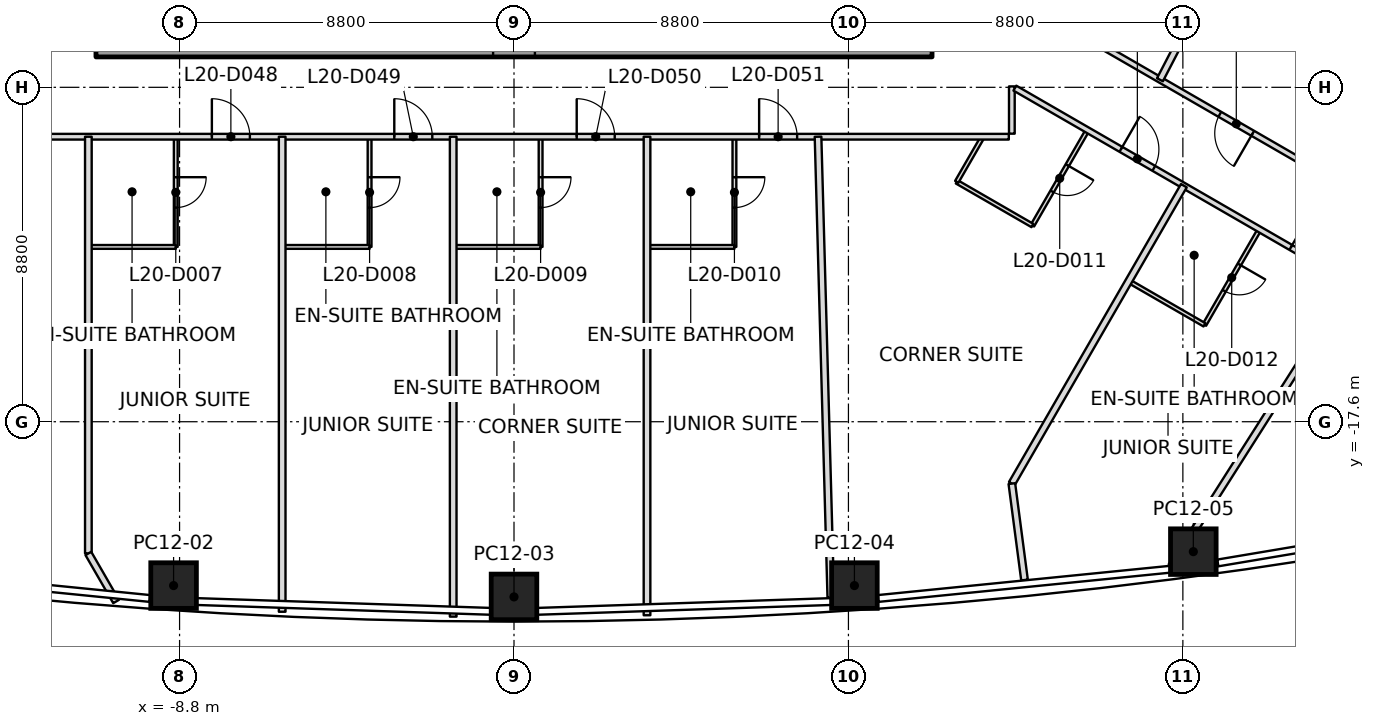
"""IFC4 building model, lengths in metres.
Left out: names, types, materials, properties, quantities, classifications, styles, units other than length and angle.
Written with IfcOpenShell. Run it as: python <this file> out.ifc"""

import sys

from ifc_helpers import new_model, si_unit, direction, frame, frame_2d, origin, origin_2d, place, context, subcontext, project, spatial, rectangle, extrude, element, fill, save


model = new_model("IFC4")
c1 = context("Model", 3, precision=1e-05, world=origin(), true_north=direction((0.0, 1.0)))
c2 = subcontext(c1, "Body", "Model", "MODEL_VIEW")
j1 = project(units=[si_unit("LENGTHUNIT", "METRE"), si_unit("PLANEANGLEUNIT", "RADIAN")], contexts=[c1])
p1 = place(None, origin())
s1 = spatial("IfcSite", under=j1, at=p1, CompositionType="ELEMENT")
p2 = place(p1, origin())
s2 = spatial("IfcBuilding", under=s1, at=p2, CompositionType="ELEMENT")
p3 = place(p2, frame((0.0, 0.0, 96.1)))
s3 = spatial("IfcBuildingStorey", under=s2, at=p3, CompositionType="ELEMENT", Elevation=96.1)
p4 = place(p3, frame((-8.958, -21.912, 0.0), z_axis=(0.009632635025, 0.012073782257, 0.999880710947), x_axis=(-0.997741389803, 0.066592340641, 0.008807907923)))
e1 = element("IfcColumn", 1, at=p4, inside=s3, PredefinedType="COLUMN", context=c2, shape_type="SweptSolid", body=[
    extrude(rectangle(XDim=1.2, YDim=1.2, at=origin_2d()), origin(), (0.0, 0.0, 1.0), 3.7),
])
p5 = place(p3, frame((0.0, -22.21, 0.0), z_axis=(0.0, 0.012338222751, 0.999923881233), x_axis=(1.0, 0.0, 0.0)))
e2 = element("IfcColumn", 2, at=p5, inside=s3, PredefinedType="COLUMN", context=c2, shape_type="SweptSolid", body=[
    extrude(rectangle(XDim=1.2, YDim=1.2, at=origin_2d()), origin(), (0.0, 0.0, 1.0), 3.7),
])
p6 = place(p3, frame((8.958, -21.912, 0.0), z_axis=(-0.009632635025, 0.012073782257, 0.999880710947), x_axis=(0.997741389803, 0.066592340641, 0.008807907923)))
e3 = element("IfcColumn", 3, at=p6, inside=s3, PredefinedType="COLUMN", context=c2, shape_type="SweptSolid", body=[
    extrude(rectangle(XDim=1.2, YDim=1.2, at=origin_2d()), origin(), (0.0, 0.0, 1.0), 3.7),
])
p7 = place(p3, frame((17.875, -21.019, 0.0), z_axis=(-0.019196808933, 0.011346567479, 0.99975133805), x_axis=(0.990978101664, 0.132873777201, 0.01752031263)))
e4 = element("IfcColumn", 4, at=p7, inside=s3, PredefinedType="COLUMN", context=c2, shape_type="SweptSolid", body=[
    extrude(rectangle(XDim=1.2, YDim=1.2, at=origin_2d()), origin(), (0.0, 0.0, 1.0), 3.701),
])
p8 = place(p3, frame((-11.0, -7.75, 0.0), z_axis=(0.0, 0.0, 1.0), x_axis=(1.0, 0.0, 0.0)))
e5 = element("IfcWall", 5, at=p8, inside=s3, PredefinedType="SHEAR", context=c2, shape_type="SweptSolid", body=[
    extrude(rectangle(XDim=22.0, YDim=0.5, at=frame_2d((11.0, 0.0))), origin(), (0.0, 0.0, 1.0), 3.7),
])
p9 = place(p8, frame((10.45, 0.0, 0.0)))
e6 = element("IfcOpeningElement", 6, at=p9, cuts=e5, PredefinedType="OPENING", context=c2, shape_type="SweptSolid", body=[
    extrude(rectangle(XDim=1.1, YDim=2.1, at=frame_2d((0.55, 1.05))), frame((0.0, 0.25, 0.0), z_axis=(0.0, -1.0, 0.0), x_axis=(1.0, 0.0, 0.0)), (0.0, 0.0, 1.0), 0.5),
])
p10 = place(p3, frame((-11.2, -10.1, 0.0), z_axis=(0.0, 0.0, 1.0), x_axis=(0.0, -1.0, 0.0)))
e7 = element("IfcWall", 7, at=p10, inside=s3, PredefinedType="PARTITIONING", context=c2, shape_type="SweptSolid", body=[
    extrude(rectangle(XDim=10.967, YDim=0.175, at=frame_2d((5.483, 0.0))), origin(), (0.0, 0.0, 1.0), 3.017),
])
p11 = place(p3, frame((-11.2, -21.067, 0.0), z_axis=(0.0, 0.0, 1.0), x_axis=(0.499934806282, -0.866063040123, 0.0)))
e8 = element("IfcWall", 8, at=p11, inside=s3, PredefinedType="PARTITIONING", context=c2, shape_type="SweptSolid", body=[
    extrude(rectangle(XDim=1.46, YDim=0.175, at=frame_2d((0.73, 0.0))), origin(), (0.0, 0.0, 1.0), 2.934),
])
p12 = place(p3, frame((-6.1, -10.1, 0.0), z_axis=(0.0, 0.0, 1.0), x_axis=(0.0, -1.0, 0.0)))
e9 = element("IfcWall", 9, at=p12, inside=s3, PredefinedType="PARTITIONING", context=c2, shape_type="SweptSolid", body=[
    extrude(rectangle(XDim=12.5, YDim=0.175, at=frame_2d((6.25, 0.0))), origin(), (0.0, 0.0, 1.0), 2.934),
])
p13 = place(p3, frame((-1.6, -10.1, 0.0), z_axis=(0.0, 0.0, 1.0), x_axis=(0.0, -1.0, 0.0)))
e10 = element("IfcWall", 10, at=p13, inside=s3, PredefinedType="PARTITIONING", context=c2, shape_type="SweptSolid", body=[
    extrude(rectangle(XDim=12.628, YDim=0.175, at=frame_2d((6.314, 0.0))), origin(), (0.0, 0.0, 1.0), 2.934),
])
p14 = place(p3, frame((3.5, -10.1, 0.0), z_axis=(0.0, 0.0, 1.0), x_axis=(0.0, -1.0, 0.0)))
e11 = element("IfcWall", 11, at=p14, inside=s3, PredefinedType="PARTITIONING", context=c2, shape_type="SweptSolid", body=[
    extrude(rectangle(XDim=12.593, YDim=0.175, at=frame_2d((6.296, 0.0))), origin(), (0.0, 0.0, 1.0), 2.934),
])
p15 = place(p3, frame((8.0, -10.1, 0.0), z_axis=(0.0, 0.0, 1.0), x_axis=(0.027718493396, -0.999615768745, 0.0)))
e12 = element("IfcWall", 12, at=p15, inside=s3, PredefinedType="PARTITIONING", context=c2, shape_type="SweptSolid", body=[
    extrude(rectangle(XDim=12.137, YDim=0.175, at=frame_2d((6.069, 0.0))), origin(), (0.0, 0.0, 1.0), 2.934),
])
p16 = place(p3, frame((17.626, -11.389, 0.0), z_axis=(0.0, 0.0, 1.0), x_axis=(-0.500005721567, -0.866022100411, 0.0)))
e13 = element("IfcWall", 13, at=p16, inside=s3, PredefinedType="PARTITIONING", context=c2, shape_type="SweptSolid", body=[
    extrude(rectangle(XDim=9.052, YDim=0.175, at=frame_2d((4.526, 0.0))), origin(), (0.0, 0.0, 1.0), 2.797),
])
p17 = place(p3, frame((13.1, -19.228, 0.0), z_axis=(0.0, 0.0, 1.0), x_axis=(0.130326176188, -0.991471173459, 0.0)))
e14 = element("IfcWall", 14, at=p17, inside=s3, PredefinedType="PARTITIONING", context=c2, shape_type="SweptSolid", body=[
    extrude(rectangle(XDim=2.559, YDim=0.175, at=frame_2d((1.279, 0.0))), origin(), (0.0, 0.0, 1.0), 2.934),
])
p18 = place(p3, frame((16.997, -8.601, 0.0), z_axis=(0.0, 0.0, 1.0), x_axis=(0.460362856216, 0.887730837933, 0.0)))
e15 = element("IfcWall", 15, at=p18, inside=s3, PredefinedType="PARTITIONING", context=c2, shape_type="SweptSolid", body=[
    extrude(rectangle(XDim=14.037, YDim=0.175, at=frame_2d((7.018, 0.0))), origin(), (0.0, 0.0, 1.0), 2.947),
])
p19 = place(p3, frame((22.043, -13.939, 0.0), z_axis=(0.0, 0.0, 1.0), x_axis=(-0.536501835105, -0.843899153293, 0.0)))
e16 = element("IfcWall", 16, at=p19, inside=s3, PredefinedType="PARTITIONING", context=c2, shape_type="SweptSolid", body=[
    extrude(rectangle(XDim=8.837, YDim=0.175, at=frame_2d((4.418, 0.0))), origin(), (0.0, 0.0, 1.0), 3.15),
])
p20 = place(p3, frame((-13.02, -10.1, 0.0), z_axis=(0.0, 0.0, 1.0), x_axis=(1.0, 0.0, 0.0)))
e17 = element("IfcWall", 17, at=p20, inside=s3, PredefinedType="PARTITIONING", context=c2, shape_type="SweptSolid", body=[
    extrude(rectangle(XDim=26.04, YDim=0.15, at=frame_2d((13.02, 0.0))), origin(), (0.0, 0.0, 1.0), 3.017),
])
p21 = place(p20, frame((5.07, 0.0, 0.0)))
e18 = element("IfcOpeningElement", 18, at=p21, cuts=e17, PredefinedType="OPENING", context=c2, shape_type="SweptSolid", body=[
    extrude(rectangle(XDim=1.0, YDim=2.1, at=frame_2d((0.5, 1.05))), frame((0.0, 0.075, 0.0), z_axis=(0.0, -1.0, 0.0), x_axis=(1.0, 0.0, 0.0)), (0.0, 0.0, 1.0), 0.15),
])
p22 = place(p20, frame((9.87, 0.0, 0.0)))
e19 = element("IfcOpeningElement", 19, at=p22, cuts=e17, PredefinedType="OPENING", context=c2, shape_type="SweptSolid", body=[
    extrude(rectangle(XDim=1.0, YDim=2.1, at=frame_2d((0.5, 1.05))), frame((0.0, 0.075, 0.0), z_axis=(0.0, -1.0, 0.0), x_axis=(1.0, 0.0, 0.0)), (0.0, 0.0, 1.0), 0.15),
])
p23 = place(p20, frame((14.67, 0.0, 0.0)))
e20 = element("IfcOpeningElement", 20, at=p23, cuts=e17, PredefinedType="OPENING", context=c2, shape_type="SweptSolid", body=[
    extrude(rectangle(XDim=1.0, YDim=2.1, at=frame_2d((0.5, 1.05))), frame((0.0, 0.075, 0.0), z_axis=(0.0, -1.0, 0.0), x_axis=(1.0, 0.0, 0.0)), (0.0, 0.0, 1.0), 0.15),
])
p24 = place(p20, frame((19.47, 0.0, 0.0)))
e21 = element("IfcOpeningElement", 21, at=p24, cuts=e17, PredefinedType="OPENING", context=c2, shape_type="SweptSolid", body=[
    extrude(rectangle(XDim=1.0, YDim=2.1, at=frame_2d((0.5, 1.05))), frame((0.0, 0.075, 0.0), z_axis=(0.0, -1.0, 0.0), x_axis=(1.0, 0.0, 0.0)), (0.0, 0.0, 1.0), 0.15),
])
p25 = place(p3, frame((13.1, -10.02, 0.0), z_axis=(0.0, 0.0, 1.0), x_axis=(0.0, 1.0, 0.0)))
e22 = element("IfcWall", 22, at=p25, inside=s3, PredefinedType="PARTITIONING", context=c2, shape_type="SweptSolid", body=[
    extrude(rectangle(XDim=1.244, YDim=0.15, at=frame_2d((0.622, 0.0))), origin(), (0.0, 0.0, 1.0), 2.797),
])
p26 = place(p3, frame((13.179, -8.822, 0.0), z_axis=(0.0, 0.0, 1.0), x_axis=(0.86603304561, -0.499986763735, 0.0)))
e23 = element("IfcWall", 23, at=p26, inside=s3, PredefinedType="PARTITIONING", context=c2, shape_type="SweptSolid", body=[
    extrude(rectangle(XDim=10.155, YDim=0.15, at=frame_2d((5.077, 0.0))), origin(), (0.0, 0.0, 1.0), 2.797),
])
p27 = place(p26, frame((3.222, 0.0, 0.0)))
e24 = element("IfcOpeningElement", 24, at=p27, cuts=e23, PredefinedType="OPENING", context=c2, shape_type="SweptSolid", body=[
    extrude(rectangle(XDim=1.0, YDim=2.1, at=frame_2d((0.5, 1.05))), frame((0.0, 0.075, 0.0), z_axis=(0.0, -1.0, 0.0), x_axis=(1.0, 0.0, 0.0)), (0.0, 0.0, 1.0), 0.15),
])
p28 = place(p26, frame((8.385, 0.0, 0.0)))
e25 = element("IfcOpeningElement", 25, at=p28, cuts=e23, PredefinedType="OPENING", context=c2, shape_type="SweptSolid", body=[
    extrude(rectangle(XDim=1.0, YDim=2.1, at=frame_2d((0.5, 1.05))), frame((0.0, 0.075, 0.0), z_axis=(0.0, -1.0, 0.0), x_axis=(1.0, 0.0, 0.0)), (0.0, 0.0, 1.0), 0.15),
])
p29 = place(p3, frame((23.023, -12.08, 0.0), z_axis=(0.0, 0.0, 1.0), x_axis=(-0.866025210421, 0.500000334915, 0.0)))
e26 = element("IfcWall", 26, at=p29, inside=s3, PredefinedType="PARTITIONING", context=c2, shape_type="SweptSolid", body=[
    extrude(rectangle(XDim=11.458, YDim=0.15, at=frame_2d((5.729, 0.0))), origin(), (0.0, 0.0, 1.0), 2.947),
])
p30 = place(p29, frame((4.139, 0.0, 0.0)))
e27 = element("IfcOpeningElement", 27, at=p30, cuts=e26, PredefinedType="OPENING", context=c2, shape_type="SweptSolid", body=[
    extrude(rectangle(XDim=1.0, YDim=2.1, at=frame_2d((0.5, 1.05))), frame((0.0, 0.075, 0.0), z_axis=(0.0, -1.0, 0.0), x_axis=(1.0, 0.0, 0.0)), (0.0, 0.0, 1.0), 0.15),
])
p31 = place(p3, frame((-8.9, -10.13, 0.0), z_axis=(0.0, 0.0, 1.0), x_axis=(0.0, -1.0, 0.0)))
e28 = element("IfcWall", 28, at=p31, inside=s3, PredefinedType="PARTITIONING", context=c2, shape_type="SweptSolid", body=[
    extrude(rectangle(XDim=2.87, YDim=0.1, at=frame_2d((1.435, 0.0))), origin(), (0.0, 0.0, 1.0), 3.15),
])
p32 = place(p31, frame((1.035, 0.0, 0.0)))
e29 = element("IfcOpeningElement", 29, at=p32, cuts=e28, PredefinedType="OPENING", context=c2, shape_type="SweptSolid", body=[
    extrude(rectangle(XDim=0.8, YDim=2.1, at=frame_2d((0.4, 1.05))), frame((0.0, 0.05, 0.0), z_axis=(0.0, -1.0, 0.0), x_axis=(1.0, 0.0, 0.0)), (0.0, 0.0, 1.0), 0.1),
])
p33 = place(p3, frame((-8.9, -13.0, 0.0), z_axis=(0.0, 0.0, 1.0), x_axis=(-1.0, 0.0, 0.0)))
e30 = element("IfcWall", 30, at=p33, inside=s3, PredefinedType="PARTITIONING", context=c2, shape_type="SweptSolid", body=[
    extrude(rectangle(XDim=2.27, YDim=0.1, at=frame_2d((1.135, 0.0))), origin(), (0.0, 0.0, 1.0), 3.15),
])
p34 = place(p3, frame((-3.8, -10.13, 0.0), z_axis=(0.0, 0.0, 1.0), x_axis=(0.0, -1.0, 0.0)))
e31 = element("IfcWall", 31, at=p34, inside=s3, PredefinedType="PARTITIONING", context=c2, shape_type="SweptSolid", body=[
    extrude(rectangle(XDim=2.87, YDim=0.1, at=frame_2d((1.435, 0.0))), origin(), (0.0, 0.0, 1.0), 3.15),
])
p35 = place(p34, frame((1.035, 0.0, 0.0)))
e32 = element("IfcOpeningElement", 32, at=p35, cuts=e31, PredefinedType="OPENING", context=c2, shape_type="SweptSolid", body=[
    extrude(rectangle(XDim=0.8, YDim=2.1, at=frame_2d((0.4, 1.05))), frame((0.0, 0.05, 0.0), z_axis=(0.0, -1.0, 0.0), x_axis=(1.0, 0.0, 0.0)), (0.0, 0.0, 1.0), 0.1),
])
p36 = place(p3, frame((-3.8, -13.0, 0.0), z_axis=(0.0, 0.0, 1.0), x_axis=(-1.0, 0.0, 0.0)))
e33 = element("IfcWall", 33, at=p36, inside=s3, PredefinedType="PARTITIONING", context=c2, shape_type="SweptSolid", body=[
    extrude(rectangle(XDim=2.27, YDim=0.1, at=frame_2d((1.135, 0.0))), origin(), (0.0, 0.0, 1.0), 3.017),
])
p37 = place(p3, frame((0.7, -10.13, 0.0), z_axis=(0.0, 0.0, 1.0), x_axis=(0.0, -1.0, 0.0)))
e34 = element("IfcWall", 34, at=p37, inside=s3, PredefinedType="PARTITIONING", context=c2, shape_type="SweptSolid", body=[
    extrude(rectangle(XDim=2.87, YDim=0.1, at=frame_2d((1.435, 0.0))), origin(), (0.0, 0.0, 1.0), 3.15),
])
p38 = place(p37, frame((1.035, 0.0, 0.0)))
e35 = element("IfcOpeningElement", 35, at=p38, cuts=e34, PredefinedType="OPENING", context=c2, shape_type="SweptSolid", body=[
    extrude(rectangle(XDim=0.8, YDim=2.1, at=frame_2d((0.4, 1.05))), frame((0.0, 0.05, 0.0), z_axis=(0.0, -1.0, 0.0), x_axis=(1.0, 0.0, 0.0)), (0.0, 0.0, 1.0), 0.1),
])
p39 = place(p3, frame((0.7, -13.0, 0.0), z_axis=(0.0, 0.0, 1.0), x_axis=(-1.0, 0.0, 0.0)))
e36 = element("IfcWall", 36, at=p39, inside=s3, PredefinedType="PARTITIONING", context=c2, shape_type="SweptSolid", body=[
    extrude(rectangle(XDim=2.27, YDim=0.1, at=frame_2d((1.135, 0.0))), origin(), (0.0, 0.0, 1.0), 3.017),
])
p40 = place(p3, frame((5.8, -10.13, 0.0), z_axis=(0.0, 0.0, 1.0), x_axis=(0.0, -1.0, 0.0)))
e37 = element("IfcWall", 37, at=p40, inside=s3, PredefinedType="PARTITIONING", context=c2, shape_type="SweptSolid", body=[
    extrude(rectangle(XDim=2.87, YDim=0.1, at=frame_2d((1.435, 0.0))), origin(), (0.0, 0.0, 1.0), 3.15),
])
p41 = place(p40, frame((1.035, 0.0, 0.0)))
e38 = element("IfcOpeningElement", 38, at=p41, cuts=e37, PredefinedType="OPENING", context=c2, shape_type="SweptSolid", body=[
    extrude(rectangle(XDim=0.8, YDim=2.1, at=frame_2d((0.4, 1.05))), frame((0.0, 0.05, 0.0), z_axis=(0.0, -1.0, 0.0), x_axis=(1.0, 0.0, 0.0)), (0.0, 0.0, 1.0), 0.1),
])
p42 = place(p3, frame((5.8, -13.0, 0.0), z_axis=(0.0, 0.0, 1.0), x_axis=(-1.0, 0.0, 0.0)))
e39 = element("IfcWall", 39, at=p42, inside=s3, PredefinedType="PARTITIONING", context=c2, shape_type="SweptSolid", body=[
    extrude(rectangle(XDim=2.27, YDim=0.1, at=frame_2d((1.135, 0.0))), origin(), (0.0, 0.0, 1.0), 3.017),
])
p43 = place(p3, frame((15.077, -9.952, 0.0), z_axis=(0.0, 0.0, 1.0), x_axis=(-0.499999802827, -0.866025517622, 0.0)))
e40 = element("IfcWall", 40, at=p43, inside=s3, PredefinedType="PARTITIONING", context=c2, shape_type="SweptSolid", body=[
    extrude(rectangle(XDim=2.87, YDim=0.1, at=frame_2d((1.435, 0.0))), origin(), (0.0, 0.0, 1.0), 2.797),
])
p44 = place(p43, frame((1.035, 0.0, 0.0)))
e41 = element("IfcOpeningElement", 41, at=p44, cuts=e40, PredefinedType="OPENING", context=c2, shape_type="SweptSolid", body=[
    extrude(rectangle(XDim=0.8, YDim=2.1, at=frame_2d((0.4, 1.05))), frame((0.0, 0.05, 0.0), z_axis=(0.0, -1.0, 0.0), x_axis=(1.0, 0.0, 0.0)), (0.0, 0.0, 1.0), 0.1),
])
p45 = place(p3, frame((13.642, -12.437, 0.0), z_axis=(0.0, 0.0, 1.0), x_axis=(-0.866007057882, 0.500031774688, 0.0)))
e42 = element("IfcWall", 42, at=p45, inside=s3, PredefinedType="PARTITIONING", context=c2, shape_type="SweptSolid", body=[
    extrude(rectangle(XDim=2.3, YDim=0.1, at=frame_2d((1.15, 0.0))), origin(), (0.0, 0.0, 1.0), 3.15),
])
p46 = place(p3, frame((11.65, -11.287, 0.0), z_axis=(0.0, 0.0, 1.0), x_axis=(0.500049290317, 0.865996944136, 0.0)))
e43 = element("IfcWall", 43, at=p46, inside=s3, PredefinedType="PARTITIONING", context=c2, shape_type="SweptSolid", body=[
    extrude(rectangle(XDim=1.336, YDim=0.1, at=frame_2d((0.668, 0.0))), origin(), (0.0, 0.0, 1.0), 3.15),
])
p47 = place(p3, frame((19.603, -12.565, 0.0), z_axis=(0.0, 0.0, 1.0), x_axis=(-0.499936001555, -0.866062350151, 0.0)))
e44 = element("IfcWall", 44, at=p47, inside=s3, PredefinedType="PARTITIONING", context=c2, shape_type="SweptSolid", body=[
    extrude(rectangle(XDim=2.87, YDim=0.1, at=frame_2d((1.435, 0.0))), origin(), (0.0, 0.0, 1.0), 3.15),
])
p48 = place(p47, frame((1.035, 0.0, 0.0)))
e45 = element("IfcOpeningElement", 45, at=p48, cuts=e44, PredefinedType="OPENING", context=c2, shape_type="SweptSolid", body=[
    extrude(rectangle(XDim=0.8, YDim=2.1, at=frame_2d((0.4, 1.05))), frame((0.0, 0.05, 0.0), z_axis=(0.0, -1.0, 0.0), x_axis=(1.0, 0.0, 0.0)), (0.0, 0.0, 1.0), 0.1),
])
p49 = place(p3, frame((18.168, -15.05, 0.0), z_axis=(0.0, 0.0, 1.0), x_axis=(-0.866044110172, 0.499967598186, 0.0)))
e46 = element("IfcWall", 46, at=p49, inside=s3, PredefinedType="PARTITIONING", context=c2, shape_type="SweptSolid", body=[
    extrude(rectangle(XDim=2.27, YDim=0.1, at=frame_2d((1.135, 0.0))), origin(), (0.0, 0.0, 1.0), 3.15),
])
p50 = place(p21, origin())
e47 = element("IfcDoor", 47, at=p50, inside=s3, OperationType="SINGLE_SWING_LEFT", PredefinedType="DOOR", context=c2, shape_type="SweptSolid", body=[
    extrude(rectangle(XDim=1.0, YDim=2.1, at=frame_2d((0.5, 1.05))), frame((0.0, 0.025, 0.0), z_axis=(0.0, -1.0, 0.0), x_axis=(1.0, 0.0, 0.0)), (0.0, 0.0, 1.0), 0.05),
])
fill(e18, e47)
p51 = place(p32, origin())
e48 = element("IfcDoor", 48, at=p51, inside=s3, OperationType="SINGLE_SWING_RIGHT", PredefinedType="DOOR", context=c2, shape_type="SweptSolid", body=[
    extrude(rectangle(XDim=0.8, YDim=2.1, at=frame_2d((0.4, 1.05))), frame((0.0, 0.025, 0.0), z_axis=(0.0, -1.0, 0.0), x_axis=(1.0, 0.0, 0.0)), (0.0, 0.0, 1.0), 0.05),
])
fill(e29, e48)
p52 = place(p22, origin())
e49 = element("IfcDoor", 49, at=p52, inside=s3, OperationType="SINGLE_SWING_LEFT", PredefinedType="DOOR", context=c2, shape_type="SweptSolid", body=[
    extrude(rectangle(XDim=1.0, YDim=2.1, at=frame_2d((0.5, 1.05))), frame((0.0, 0.025, 0.0), z_axis=(0.0, -1.0, 0.0), x_axis=(1.0, 0.0, 0.0)), (0.0, 0.0, 1.0), 0.05),
])
fill(e19, e49)
p53 = place(p35, origin())
e50 = element("IfcDoor", 50, at=p53, inside=s3, OperationType="SINGLE_SWING_LEFT", PredefinedType="DOOR", context=c2, shape_type="SweptSolid", body=[
    extrude(rectangle(XDim=0.8, YDim=2.1, at=frame_2d((0.4, 1.05))), frame((0.0, 0.025, 0.0), z_axis=(0.0, -1.0, 0.0), x_axis=(1.0, 0.0, 0.0)), (0.0, 0.0, 1.0), 0.05),
])
fill(e32, e50)
p54 = place(p23, origin())
e51 = element("IfcDoor", 51, at=p54, inside=s3, OperationType="SINGLE_SWING_LEFT", PredefinedType="DOOR", context=c2, shape_type="SweptSolid", body=[
    extrude(rectangle(XDim=1.0, YDim=2.1, at=frame_2d((0.5, 1.05))), frame((0.0, 0.025, 0.0), z_axis=(0.0, -1.0, 0.0), x_axis=(1.0, 0.0, 0.0)), (0.0, 0.0, 1.0), 0.05),
])
fill(e20, e51)
p55 = place(p38, origin())
e52 = element("IfcDoor", 52, at=p55, inside=s3, OperationType="SINGLE_SWING_RIGHT", PredefinedType="DOOR", context=c2, shape_type="SweptSolid", body=[
    extrude(rectangle(XDim=0.8, YDim=2.1, at=frame_2d((0.4, 1.05))), frame((0.0, 0.025, 0.0), z_axis=(0.0, -1.0, 0.0), x_axis=(1.0, 0.0, 0.0)), (0.0, 0.0, 1.0), 0.05),
])
fill(e35, e52)
p56 = place(p24, origin())
e53 = element("IfcDoor", 53, at=p56, inside=s3, OperationType="SINGLE_SWING_LEFT", PredefinedType="DOOR", context=c2, shape_type="SweptSolid", body=[
    extrude(rectangle(XDim=1.0, YDim=2.1, at=frame_2d((0.5, 1.05))), frame((0.0, 0.025, 0.0), z_axis=(0.0, -1.0, 0.0), x_axis=(1.0, 0.0, 0.0)), (0.0, 0.0, 1.0), 0.05),
])
fill(e21, e53)
p57 = place(p41, origin())
e54 = element("IfcDoor", 54, at=p57, inside=s3, OperationType="SINGLE_SWING_RIGHT", PredefinedType="DOOR", context=c2, shape_type="SweptSolid", body=[
    extrude(rectangle(XDim=0.8, YDim=2.1, at=frame_2d((0.4, 1.05))), frame((0.0, 0.025, 0.0), z_axis=(0.0, -1.0, 0.0), x_axis=(1.0, 0.0, 0.0)), (0.0, 0.0, 1.0), 0.05),
])
fill(e38, e54)
p58 = place(p27, origin())
e55 = element("IfcDoor", 55, at=p58, inside=s3, OperationType="SINGLE_SWING_LEFT", PredefinedType="DOOR", context=c2, shape_type="SweptSolid", body=[
    extrude(rectangle(XDim=1.0, YDim=2.1, at=frame_2d((0.5, 1.05))), frame((0.0, 0.025, 0.0), z_axis=(0.0, -1.0, 0.0), x_axis=(1.0, 0.0, 0.0)), (0.0, 0.0, 1.0), 0.05),
])
fill(e24, e55)
p59 = place(p44, origin())
e56 = element("IfcDoor", 56, at=p59, inside=s3, OperationType="SINGLE_SWING_LEFT", PredefinedType="DOOR", context=c2, shape_type="SweptSolid", body=[
    extrude(rectangle(XDim=0.8, YDim=2.1, at=frame_2d((0.4, 1.05))), frame((0.0, 0.025, 0.0), z_axis=(0.0, -1.0, 0.0), x_axis=(1.0, 0.0, 0.0)), (0.0, 0.0, 1.0), 0.05),
])
fill(e41, e56)
p60 = place(p28, origin())
e57 = element("IfcDoor", 57, at=p60, inside=s3, OperationType="SINGLE_SWING_LEFT", PredefinedType="DOOR", context=c2, shape_type="SweptSolid", body=[
    extrude(rectangle(XDim=1.0, YDim=2.1, at=frame_2d((0.5, 1.05))), frame((0.0, 0.025, 0.0), z_axis=(0.0, -1.0, 0.0), x_axis=(1.0, 0.0, 0.0)), (0.0, 0.0, 1.0), 0.05),
])
fill(e25, e57)
p61 = place(p48, origin())
e58 = element("IfcDoor", 58, at=p61, inside=s3, OperationType="SINGLE_SWING_LEFT", PredefinedType="DOOR", context=c2, shape_type="SweptSolid", body=[
    extrude(rectangle(XDim=0.8, YDim=2.1, at=frame_2d((0.4, 1.05))), frame((0.0, 0.025, 0.0), z_axis=(0.0, -1.0, 0.0), x_axis=(1.0, 0.0, 0.0)), (0.0, 0.0, 1.0), 0.05),
])
fill(e45, e58)
p62 = place(p30, origin())
e59 = element("IfcDoor", 59, at=p62, inside=s3, OperationType="SINGLE_SWING_LEFT", PredefinedType="DOOR", context=c2, shape_type="SweptSolid", body=[
    extrude(rectangle(XDim=1.0, YDim=2.1, at=frame_2d((0.5, 1.05))), frame((0.0, 0.025, 0.0), z_axis=(0.0, -1.0, 0.0), x_axis=(1.0, 0.0, 0.0)), (0.0, 0.0, 1.0), 0.05),
])
fill(e27, e59)
save(model, sys.argv[1])
